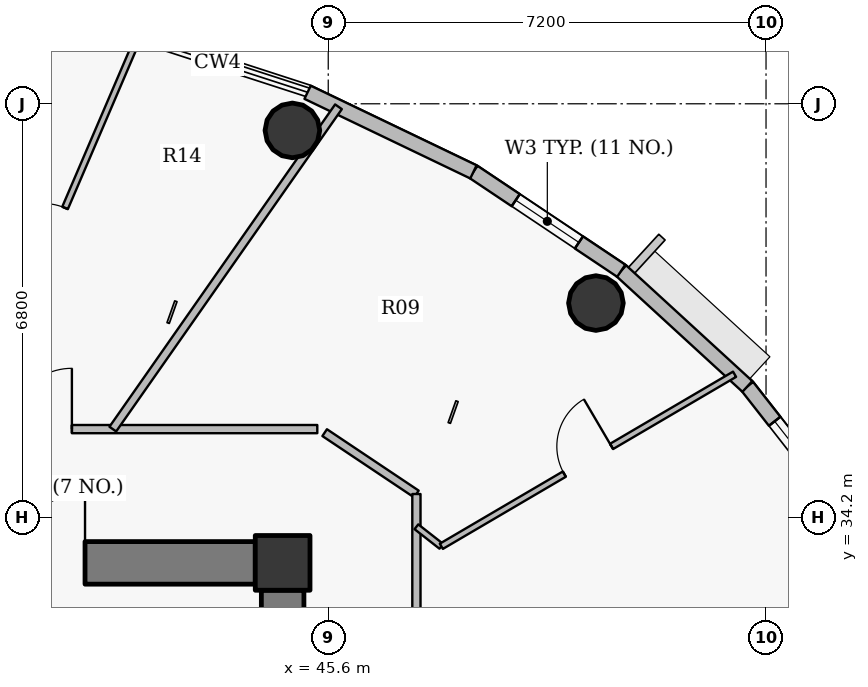
"""IFC4 building model, lengths in metres.
Left out: names, types, materials, properties, quantities, classifications, styles, units other than length and angle.
Written with IfcOpenShell. Run it as: python <this file> out.ifc"""

import sys

from ifc_helpers import new_model, si_unit, direction, frame, frame_2d, origin, origin_2d, place, context, subcontext, project, spatial, rectangle, hollow_circle, extrude, source, transform, mapped, element, fill, save


model = new_model("IFC4")
c1 = context("Model", 3, precision=1e-05, world=origin(), true_north=direction((0.0, 1.0)))
c2 = subcontext(c1, "Body", "Model", "MODEL_VIEW")
j1 = project(units=[si_unit("LENGTHUNIT", "METRE"), si_unit("PLANEANGLEUNIT", "RADIAN")], contexts=[c1])
p1 = place(None, origin())
s1 = spatial("IfcSite", under=j1, at=p1, CompositionType="ELEMENT")
p2 = place(p1, origin())
s2 = spatial("IfcBuilding", under=s1, at=p2, CompositionType="ELEMENT")
p3 = place(p2, frame((0.0, 0.0, 327.8)))
s3 = spatial("IfcBuildingStorey", under=s2, at=p3, CompositionType="ELEMENT", Elevation=327.8)
p4 = place(p3, frame((44.85, 33.45, 0.0), z_axis=(0.0, 0.0, 1.0), x_axis=(1.0, 0.0, 0.0)))
e1 = element("IfcColumn", 1, at=p4, inside=s3, PredefinedType="COLUMN", context=c2, shape_type="SweptSolid", body=[
    extrude(rectangle(XDim=0.9, YDim=0.9, at=origin_2d()), origin(), (0.0, 0.0, 1.0), 3.8),
])
p5 = place(p3, frame((27.6, 33.45, 0.0), z_axis=(0.0, 0.0, 1.0), x_axis=(1.0, 0.0, 0.0)))
e2 = element("IfcWall", 2, at=p5, inside=s3, PredefinedType="SHEAR", context=c2, shape_type="SweptSolid", body=[
    extrude(rectangle(XDim=16.8, YDim=0.7, at=frame_2d((8.4, 0.0))), origin(), (0.0, 0.0, 1.0), 3.1),
])
p6 = place(p5, frame((12.85, 0.0, 0.0)))
e3 = element("IfcOpeningElement", 3, at=p6, cuts=e2, PredefinedType="OPENING", context=c2, shape_type="SweptSolid", body=[
    extrude(rectangle(XDim=1.15, YDim=2.15, at=origin_2d()), frame((0.575, 0.36, 1.075), z_axis=(0.0, -1.0, 0.0), x_axis=(1.0, 0.0, 0.0)), (0.0, 0.0, 1.0), 0.72),
])
p7 = place(p3, frame((44.85, 33.0, 0.0), z_axis=(0.0, 0.0, 1.0), x_axis=(0.0, -1.0, 0.0)))
e4 = element("IfcWall", 4, at=p7, inside=s3, PredefinedType="SHEAR", context=c2, shape_type="SweptSolid", body=[
    extrude(rectangle(XDim=12.0, YDim=0.7, at=frame_2d((6.0, 0.0))), origin(), (0.0, 0.0, 1.0), 3.1),
])
for number, where, z_axis, x_axis in (
    (5, (50.002, 37.723, 0.0), (0.0, 0.0, 1.0), (1.0, 0.0, 0.0)),
    (6, (45.01, 40.562, 0.0), (0.0, 0.0, 1.0), (1.0, 0.0, 0.0)),
):
    element("IfcColumn", number, at=place(p3, frame(where, z_axis=z_axis, x_axis=x_axis)), inside=s3, PredefinedType="COLUMN", context=c2, shape_type="SweptSolid", body=[
        extrude(hollow_circle(Radius=0.45, WallThickness=0.028, at=origin_2d()), origin(), (0.0, 0.0, 1.0), 3.8),
    ])
p8 = place(p3, frame((52.493, 36.352, 0.0), z_axis=(0.0, 0.0, 1.0), x_axis=(0.616286367698, -0.78752213492, 0.0)))
e7 = element("IfcWall", 7, at=p8, inside=s3, PredefinedType="SOLIDWALL", context=c2, shape_type="SweptSolid", body=[
    extrude(rectangle(XDim=2.706, YDim=0.24, at=frame_2d((1.353, 0.0))), origin(), (0.0, 0.0, 1.0), 3.55),
])
p9 = place(p8, frame((0.728, 0.0, 0.9)))
e8 = element("IfcOpeningElement", 8, at=p9, cuts=e7, PredefinedType="OPENING", context=c2, shape_type="SweptSolid", body=[
    extrude(rectangle(XDim=1.25, YDim=1.65, at=origin_2d()), frame((0.625, 0.13, 0.825), z_axis=(0.0, -1.0, 0.0), x_axis=(1.0, 0.0, 0.0)), (0.0, 0.0, 1.0), 0.26),
])
p10 = place(p3, frame((50.419, 38.254, 0.0), z_axis=(0.0, 0.0, 1.0), x_axis=(0.737020907932, -0.675869944051, 0.0)))
e9 = element("IfcWall", 9, at=p10, inside=s3, PredefinedType="SOLIDWALL", context=c2, shape_type="SweptSolid", body=[
    extrude(rectangle(XDim=2.815, YDim=0.24, at=frame_2d((1.407, 0.0))), origin(), (0.0, 0.0, 1.0), 3.55),
])
p11 = place(p3, frame((47.988, 39.88, 0.0), z_axis=(0.0, 0.0, 1.0), x_axis=(0.831201688654, -0.555970999944, 0.0)))
e10 = element("IfcWall", 10, at=p11, inside=s3, PredefinedType="SOLIDWALL", context=c2, shape_type="SweptSolid", body=[
    extrude(rectangle(XDim=2.925, YDim=0.24, at=frame_2d((1.462, 0.0))), origin(), (0.0, 0.0, 1.0), 3.55),
])
p12 = place(p11, frame((0.837, 0.0, 0.9)))
e11 = element("IfcOpeningElement", 11, at=p12, cuts=e10, PredefinedType="OPENING", context=c2, shape_type="SweptSolid", body=[
    extrude(rectangle(XDim=1.25, YDim=1.65, at=origin_2d()), frame((0.625, 0.13, 0.825), z_axis=(0.0, -1.0, 0.0), x_axis=(1.0, 0.0, 0.0)), (0.0, 0.0, 1.0), 0.26),
])
p13 = place(p3, frame((45.26, 41.189, 0.0), z_axis=(0.0, 0.0, 1.0), x_axis=(0.901557057889, -0.432660226241, 0.0)))
e12 = element("IfcWall", 12, at=p13, inside=s3, PredefinedType="SOLIDWALL", context=c2, shape_type="SweptSolid", body=[
    extrude(rectangle(XDim=3.025, YDim=0.24, at=frame_2d((1.513, 0.0))), origin(), (0.0, 0.0, 1.0), 3.55),
])
p14 = place(p3, frame((36.95, 35.65, 0.0), z_axis=(0.0, 0.0, 1.0), x_axis=(1.0, 0.0, 0.0)))
e13 = element("IfcWall", 13, at=p14, inside=s3, PredefinedType="PARTITIONING", context=c2, shape_type="SweptSolid", body=[
    extrude(rectangle(XDim=8.47, YDim=0.135, at=frame_2d((4.235, 0.0))), origin(), (0.0, 0.0, 1.0), 3.085),
])
p15 = place(p14, frame((3.434, 0.0, 0.0)))
e14 = element("IfcOpeningElement", 14, at=p15, cuts=e13, PredefinedType="OPENING", context=c2, shape_type="SweptSolid", body=[
    extrude(rectangle(XDim=1.0, YDim=2.15, at=origin_2d()), frame((0.5, 0.078, 1.075), z_axis=(0.0, -1.0, 0.0), x_axis=(1.0, 0.0, 0.0)), (0.0, 0.0, 1.0), 0.155),
])
p16 = place(p3, frame((39.711, 35.65, 0.0), z_axis=(0.0, 0.0, 1.0), x_axis=(0.39425107449, 0.919002769454, 0.0)))
e15 = element("IfcWall", 15, at=p16, inside=s3, PredefinedType="PARTITIONING", context=c2, shape_type="SweptSolid", body=[
    extrude(rectangle(XDim=7.015, YDim=0.1, at=frame_2d((3.508, 0.0))), origin(), (0.0, 0.0, 1.0), 3.035),
])
p17 = place(p16, frame((3.058, 0.0, 0.0)))
e16 = element("IfcOpeningElement", 16, at=p17, cuts=e15, PredefinedType="OPENING", context=c2, shape_type="SweptSolid", body=[
    extrude(rectangle(XDim=0.9, YDim=2.1, at=origin_2d()), frame((0.45, 0.06, 1.05), z_axis=(0.0, -1.0, 0.0), x_axis=(1.0, 0.0, 0.0)), (0.0, 0.0, 1.0), 0.12),
])
p18 = place(p3, frame((42.057, 35.65, 0.0), z_axis=(0.0, 0.0, 1.0), x_axis=(0.57355349769, 0.819168105634, 0.0)))
e17 = element("IfcWall", 17, at=p18, inside=s3, PredefinedType="PARTITIONING", context=c2, shape_type="SweptSolid", body=[
    extrude(rectangle(XDim=6.471, YDim=0.135, at=frame_2d((3.235, 0.0))), origin(), (0.0, 0.0, 1.0), 3.035),
])
p19 = place(p3, frame((45.541, 35.592, 0.0), z_axis=(0.0, 0.0, 1.0), x_axis=(0.831180227396, -0.556003084151, 0.0)))
e18 = element("IfcWall", 18, at=p19, inside=s3, PredefinedType="PARTITIONING", context=c2, shape_type="SweptSolid", body=[
    extrude(rectangle(XDim=1.815, YDim=0.135, at=frame_2d((0.908, 0.0))), origin(), (0.0, 0.0, 1.0), 3.085),
])
p20 = place(p3, frame((47.05, 19.417, 0.0), z_axis=(0.0, 0.0, 1.0), x_axis=(0.0, 1.0, 0.0)))
e19 = element("IfcWall", 19, at=p20, inside=s3, PredefinedType="PARTITIONING", context=c2, shape_type="SweptSolid", body=[
    extrude(rectangle(XDim=15.165, YDim=0.135, at=frame_2d((7.583, 0.0))), origin(), (0.0, 0.0, 1.0), 3.085),
])
p21 = place(p20, frame((9.957, 0.0, 0.0)))
e20 = element("IfcOpeningElement", 20, at=p21, cuts=e19, PredefinedType="OPENING", context=c2, shape_type="SweptSolid", body=[
    extrude(rectangle(XDim=1.0, YDim=2.15, at=origin_2d()), frame((0.5, 0.078, 1.075), z_axis=(0.0, -1.0, 0.0), x_axis=(1.0, 0.0, 0.0)), (0.0, 0.0, 1.0), 0.155),
])
p22 = place(p3, frame((47.05, 34.044, 0.0), z_axis=(0.0, 0.0, 1.0), x_axis=(0.787277370311, -0.616599012483, 0.0)))
e21 = element("IfcWall", 21, at=p22, inside=s3, PredefinedType="PARTITIONING", context=c2, shape_type="SweptSolid", body=[
    extrude(rectangle(XDim=0.521, YDim=0.1, at=frame_2d((0.26, 0.0))), origin(), (0.0, 0.0, 1.0), 3.55),
])
p23 = place(p3, frame((47.46, 33.723, 0.0), z_axis=(0.0, 0.0, 1.0), x_axis=(0.862533037069, 0.506000750952, 0.0)))
e22 = element("IfcWall", 22, at=p23, inside=s3, PredefinedType="PARTITIONING", context=c2, shape_type="SweptSolid", body=[
    extrude(rectangle(XDim=5.591, YDim=0.1, at=frame_2d((2.795, 0.0))), origin(), (0.0, 0.0, 1.0), 3.035),
])
p24 = place(p23, frame((2.345, 0.0, 0.0)))
e23 = element("IfcOpeningElement", 23, at=p24, cuts=e22, PredefinedType="OPENING", context=c2, shape_type="SweptSolid", body=[
    extrude(rectangle(XDim=0.9, YDim=2.1, at=origin_2d()), frame((0.45, 0.06, 1.05), z_axis=(0.0, -1.0, 0.0), x_axis=(1.0, 0.0, 0.0)), (0.0, 0.0, 1.0), 0.12),
])
p25 = place(p3, frame((45.2, 33.8, 0.0), z_axis=(0.0, 0.0, 1.0), x_axis=(-1.0, 0.0, 0.0)))
e24 = element("IfcWall", 24, at=p25, inside=s3, PredefinedType="PARTITIONING", context=c2, shape_type="SweptSolid", body=[
    extrude(rectangle(XDim=0.79, YDim=0.135, at=frame_2d((0.395, 0.0))), origin(), (0.0, 0.0, 1.0), 3.085),
])
p26 = place(p3, frame((45.2, 33.01, 0.0), z_axis=(0.0, 0.0, 1.0), x_axis=(0.0, 1.0, 0.0)))
e25 = element("IfcWall", 25, at=p26, inside=s3, PredefinedType="PARTITIONING", context=c2, shape_type="SweptSolid", body=[
    extrude(rectangle(XDim=0.482, YDim=0.135, at=frame_2d((0.241, 0.0))), origin(), (0.0, 0.0, 1.0), 3.55),
])
m1 = source(origin(), c2, "Body", "SweptSolid", [
    extrude(rectangle(XDim=1.25, YDim=1.65, at=origin_2d()), frame((0.625, 0.03, 0.825), z_axis=(0.0, -1.0, 0.0), x_axis=(1.0, 0.0, 0.0)), (0.0, 0.0, 1.0), 0.06),
])
p27 = place(p12, origin())
e26 = element("IfcWindow", 26, at=p27, inside=s3, PartitioningType="SINGLE_PANEL", PredefinedType="WINDOW", context=c2, shape_type="MappedRepresentation", body=[
    mapped(m1, transform((0.0, 0.0, 0.0), x_axis=(1.0, 0.0, 0.0), y_axis=(0.0, 1.0, 0.0), z_axis=(0.0, 0.0, 1.0), scale=1.0)),
])
fill(e11, e26)
p28 = place(p9, origin())
e27 = element("IfcWindow", 27, at=p28, inside=s3, PartitioningType="SINGLE_PANEL", PredefinedType="WINDOW", context=c2, shape_type="MappedRepresentation", body=[
    mapped(m1, transform((0.0, 0.0, 0.0), x_axis=(1.0, 0.0, 0.0), y_axis=(0.0, 1.0, 0.0), z_axis=(0.0, 0.0, 1.0), scale=1.0)),
])
fill(e8, e27)
m2 = source(origin(), c2, "Body", "SweptSolid", [
    extrude(rectangle(XDim=1.15, YDim=2.15, at=origin_2d()), frame((0.575, 0.025, 1.075), z_axis=(0.0, -1.0, 0.0), x_axis=(1.0, 0.0, 0.0)), (0.0, 0.0, 1.0), 0.05),
])
p29 = place(p6, origin())
e28 = element("IfcDoor", 28, at=p29, inside=s3, OperationType="SINGLE_SWING_RIGHT", PredefinedType="DOOR", context=c2, shape_type="MappedRepresentation", body=[
    mapped(m2, transform((0.0, 0.0, 0.0), x_axis=(1.0, 0.0, 0.0), y_axis=(0.0, 1.0, 0.0), z_axis=(0.0, 0.0, 1.0), scale=1.0)),
])
fill(e3, e28)
m3 = source(origin(), c2, "Body", "SweptSolid", [
    extrude(rectangle(XDim=1.0, YDim=2.15, at=origin_2d()), frame((0.5, 0.025, 1.075), z_axis=(0.0, -1.0, 0.0), x_axis=(1.0, 0.0, 0.0)), (0.0, 0.0, 1.0), 0.05),
])
p30 = place(p15, origin())
e29 = element("IfcDoor", 29, at=p30, inside=s3, OperationType="SINGLE_SWING_RIGHT", PredefinedType="DOOR", context=c2, shape_type="MappedRepresentation", body=[
    mapped(m3, transform((0.0, 0.0, 0.0), x_axis=(1.0, 0.0, 0.0), y_axis=(0.0, 1.0, 0.0), z_axis=(0.0, 0.0, 1.0), scale=1.0)),
])
fill(e14, e29)
m4 = source(origin(), c2, "Body", "SweptSolid", [
    extrude(rectangle(XDim=0.9, YDim=2.1, at=origin_2d()), frame((0.45, 0.025, 1.05), z_axis=(0.0, -1.0, 0.0), x_axis=(1.0, 0.0, 0.0)), (0.0, 0.0, 1.0), 0.05),
])
p31 = place(p17, origin())
e30 = element("IfcDoor", 30, at=p31, inside=s3, OperationType="SINGLE_SWING_LEFT", PredefinedType="DOOR", context=c2, shape_type="MappedRepresentation", body=[
    mapped(m4, transform((0.0, 0.0, 0.0), x_axis=(1.0, 0.0, 0.0), y_axis=(0.0, 1.0, 0.0), z_axis=(0.0, 0.0, 1.0), scale=1.0)),
])
fill(e16, e30)
p32 = place(p24, origin())
e31 = element("IfcDoor", 31, at=p32, inside=s3, OperationType="SINGLE_SWING_RIGHT", PredefinedType="DOOR", context=c2, shape_type="MappedRepresentation", body=[
    mapped(m4, transform((0.0, 0.0, 0.0), x_axis=(1.0, 0.0, 0.0), y_axis=(0.0, 1.0, 0.0), z_axis=(0.0, 0.0, 1.0), scale=1.0)),
])
fill(e23, e31)
save(model, sys.argv[1])
